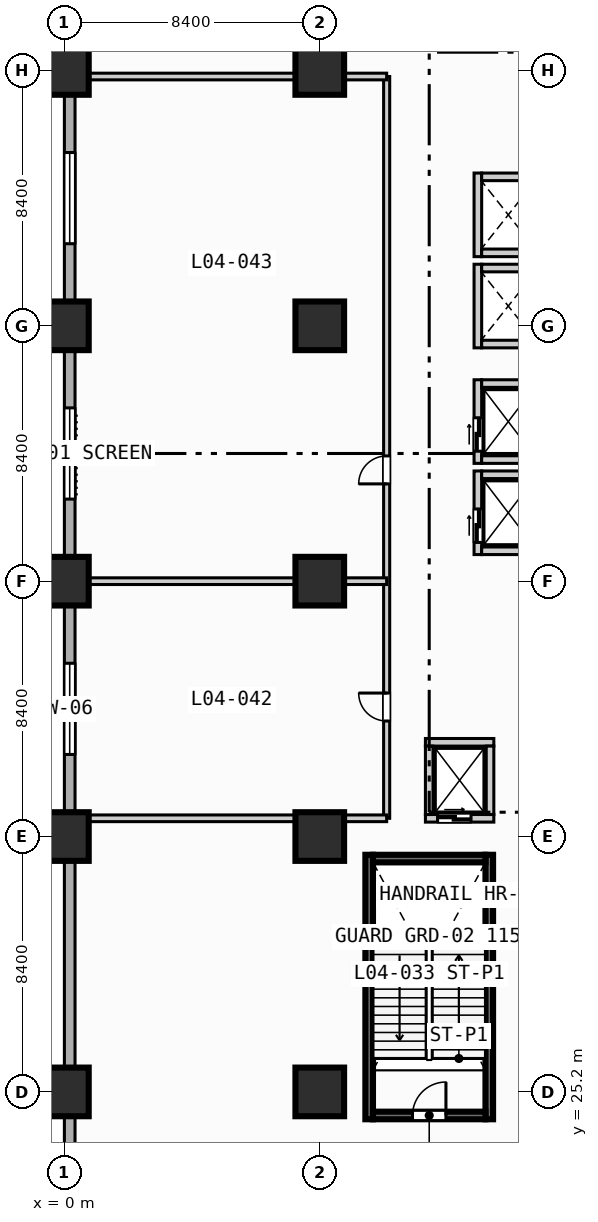
"""IFC4 building model, lengths in metres.
Left out: names, types, materials, properties, quantities, classifications, styles, units other than length and angle.
Written with IfcOpenShell. Run it as: python <this file> out.ifc"""

import sys

from ifc_helpers import new_model, si_unit, direction, frame, frame_2d, origin, origin_2d, place, context, subcontext, project, spatial, rectangle, extrude, element, fill, save


model = new_model("IFC4")
c1 = context("Model", 3, precision=1e-05, world=origin(), true_north=direction((0.0, 1.0)))
c2 = subcontext(c1, "Body", "Model", "MODEL_VIEW")
j1 = project(units=[si_unit("LENGTHUNIT", "METRE"), si_unit("PLANEANGLEUNIT", "RADIAN")], contexts=[c1])
p1 = place(None, origin())
s1 = spatial("IfcSite", under=j1, at=p1, CompositionType="ELEMENT")
p2 = place(p1, origin())
s2 = spatial("IfcBuilding", under=s1, at=p2, CompositionType="ELEMENT")
p3 = place(p2, frame((0.0, 0.0, 20.8)))
s3 = spatial("IfcBuildingStorey", under=s2, at=p3, CompositionType="ELEMENT", Elevation=20.8)
for number, where, z_axis, x_axis in (
    (1, (10.025, 24.3, 0.0), (0.0, 0.0, 1.0), (0.0, 1.0, 0.0)),
    (2, (13.975, 24.3, 0.0), (0.0, 0.0, 1.0), (0.0, 1.0, 0.0)),
):
    element("IfcWall", number, at=place(p3, frame(where, z_axis=z_axis, x_axis=x_axis)), inside=s3, PredefinedType="SOLIDWALL", context=c2, shape_type="SweptSolid", body=[
        extrude(rectangle(XDim=8.7, YDim=0.25, at=frame_2d((4.35, 0.0))), origin(), (0.0, 0.0, 1.0), 4.75),
    ])
p4 = place(p3, frame((10.15, 32.875, 0.0), z_axis=(0.0, 0.0, 1.0), x_axis=(1.0, 0.0, 0.0)))
e3 = element("IfcWall", 3, at=p4, inside=s3, PredefinedType="SOLIDWALL", context=c2, shape_type="SweptSolid", body=[
    extrude(rectangle(XDim=3.7, YDim=0.25, at=frame_2d((1.85, 0.0))), origin(), (0.0, 0.0, 1.0), 4.75),
])
for number, where, z_axis, x_axis in (
    (4, (0.0, 25.2, 0.0), (0.0, 0.0, 1.0), (1.0, 0.0, 0.0)),
    (5, (0.0, 33.6, 0.0), (0.0, 0.0, 1.0), (1.0, 0.0, 0.0)),
    (6, (0.0, 42.0, 0.0), (0.0, 0.0, 1.0), (1.0, 0.0, 0.0)),
    (7, (0.0, 50.4, 0.0), (0.0, 0.0, 1.0), (1.0, 0.0, 0.0)),
    (8, (0.0, 58.8, 0.0), (0.0, 0.0, 1.0), (1.0, 0.0, 0.0)),
    (9, (8.4, 25.2, 0.0), (0.0, 0.0, 1.0), (1.0, 0.0, 0.0)),
    (10, (8.4, 33.6, 0.0), (0.0, 0.0, 1.0), (1.0, 0.0, 0.0)),
    (11, (8.4, 42.0, 0.0), (0.0, 0.0, 1.0), (1.0, 0.0, 0.0)),
    (12, (8.4, 50.4, 0.0), (0.0, 0.0, 1.0), (1.0, 0.0, 0.0)),
    (13, (8.4, 58.8, 0.0), (0.0, 0.0, 1.0), (1.0, 0.0, 0.0)),
):
    element("IfcColumn", number, at=place(p3, frame(where, z_axis=z_axis, x_axis=x_axis)), inside=s3, PredefinedType="COLUMN", context=c2, shape_type="SweptSolid", body=[
        extrude(rectangle(XDim=1.6, YDim=1.6, at=origin_2d()), origin(), (0.0, 0.0, 1.0), 5.2),
    ])
p5 = place(p3, frame((0.175, 3.175, 0.0), z_axis=(0.0, 0.0, 1.0), x_axis=(0.0, 1.0, 0.0)))
e14 = element("IfcWall", 14, at=p5, inside=s3, PredefinedType="STANDARD", context=c2, shape_type="SweptSolid", body=[
    extrude(rectangle(XDim=86.05, YDim=0.35, at=frame_2d((43.025, 0.0))), origin(), (0.0, 0.0, 1.0), 4.75),
])
p6 = place(p5, frame((33.125, 0.0, 0.85)))
e15 = element("IfcOpeningElement", 15, at=p6, cuts=e14, PredefinedType="OPENING", context=c2, shape_type="SweptSolid", body=[
    extrude(rectangle(XDim=3.0, YDim=2.4, at=frame_2d((1.5, 1.2))), frame((0.0, 0.185, 0.0), z_axis=(0.0, -1.0, 0.0), x_axis=(1.0, 0.0, 0.0)), (0.0, 0.0, 1.0), 0.37),
])
p7 = place(p5, frame((41.525, 0.0, 0.85)))
e16 = element("IfcOpeningElement", 16, at=p7, cuts=e14, PredefinedType="OPENING", context=c2, shape_type="SweptSolid", body=[
    extrude(rectangle(XDim=3.0, YDim=2.4, at=frame_2d((1.5, 1.2))), frame((0.0, 0.185, 0.0), z_axis=(0.0, -1.0, 0.0), x_axis=(1.0, 0.0, 0.0)), (0.0, 0.0, 1.0), 0.37),
])
p8 = place(p5, frame((49.925, 0.0, 0.85)))
e17 = element("IfcOpeningElement", 17, at=p8, cuts=e14, PredefinedType="OPENING", context=c2, shape_type="SweptSolid", body=[
    extrude(rectangle(XDim=3.0, YDim=2.4, at=frame_2d((1.5, 1.2))), frame((0.0, 0.185, 0.0), z_axis=(0.0, -1.0, 0.0), x_axis=(1.0, 0.0, 0.0)), (0.0, 0.0, 1.0), 0.37),
])
p9 = place(p5, frame((66.725, 0.0, 0.85)))
e18 = element("IfcOpeningElement", 18, at=p9, cuts=e14, PredefinedType="OPENING", context=c2, shape_type="SweptSolid", body=[
    extrude(rectangle(XDim=3.0, YDim=2.4, at=frame_2d((1.5, 1.2))), frame((0.0, 0.185, 0.0), z_axis=(0.0, -1.0, 0.0), x_axis=(1.0, 0.0, 0.0)), (0.0, 0.0, 1.0), 0.37),
])
p10 = place(p5, frame((75.125, 0.0, 0.85)))
e19 = element("IfcOpeningElement", 19, at=p10, cuts=e14, PredefinedType="OPENING", context=c2, shape_type="SweptSolid", body=[
    extrude(rectangle(XDim=3.0, YDim=2.4, at=frame_2d((1.5, 1.2))), frame((0.0, 0.185, 0.0), z_axis=(0.0, -1.0, 0.0), x_axis=(1.0, 0.0, 0.0)), (0.0, 0.0, 1.0), 0.37),
])
p11 = place(p3, frame((11.875, 34.2, 0.0), z_axis=(0.0, 0.0, 1.0), x_axis=(1.0, 0.0, 0.0)))
e20 = element("IfcWall", 20, at=p11, inside=s3, PredefinedType="SOLIDWALL", context=c2, shape_type="SweptSolid", body=[
    extrude(rectangle(XDim=2.25, YDim=0.25, at=frame_2d((1.125, 0.0))), origin(), (0.0, 0.0, 1.0), 4.75),
])
p12 = place(p11, frame((0.4, 0.0, 0.0)))
e21 = element("IfcOpeningElement", 21, at=p12, cuts=e20, PredefinedType="OPENING", context=c2, shape_type="SweptSolid", body=[
    extrude(rectangle(XDim=1.1, YDim=2.15, at=frame_2d((0.55, 1.075))), frame((0.0, 0.135, 0.0), z_axis=(0.0, -1.0, 0.0), x_axis=(1.0, 0.0, 0.0)), (0.0, 0.0, 1.0), 0.27),
])
for number, where, z_axis, x_axis in (
    (22, (11.875, 36.7, 0.0), (0.0, 0.0, 1.0), (1.0, 0.0, 0.0)),
    (23, (12.0, 34.325, 0.0), (0.0, 0.0, 1.0), (0.0, 1.0, 0.0)),
    (24, (14.0, 34.325, 0.0), (0.0, 0.0, 1.0), (0.0, 1.0, 0.0)),
):
    element("IfcWall", number, at=place(p3, frame(where, z_axis=z_axis, x_axis=x_axis)), inside=s3, PredefinedType="SOLIDWALL", context=c2, shape_type="SweptSolid", body=[
        extrude(rectangle(XDim=2.25, YDim=0.25, at=frame_2d((1.125, 0.0))), origin(), (0.0, 0.0, 1.0), 4.75),
    ])
p13 = place(p3, frame((13.6, 42.875, 0.0), z_axis=(0.0, 0.0, 1.0), x_axis=(0.0, 1.0, 0.0)))
e25 = element("IfcWall", 25, at=p13, inside=s3, PredefinedType="SOLIDWALL", context=c2, shape_type="SweptSolid", body=[
    extrude(rectangle(XDim=2.75, YDim=0.25, at=frame_2d((1.375, 0.0))), origin(), (0.0, 0.0, 1.0), 4.75),
])
p14 = place(p13, frame((0.4, 0.0, 0.0)))
e26 = element("IfcOpeningElement", 26, at=p14, cuts=e25, PredefinedType="OPENING", context=c2, shape_type="SweptSolid", body=[
    extrude(rectangle(XDim=1.1, YDim=2.15, at=frame_2d((0.55, 1.075))), frame((0.0, 0.135, 0.0), z_axis=(0.0, -1.0, 0.0), x_axis=(1.0, 0.0, 0.0)), (0.0, 0.0, 1.0), 0.27),
])
for number, where, z_axis, x_axis in (
    (27, (13.725, 43.0, 0.0), (0.0, 0.0, 1.0), (1.0, 0.0, 0.0)),
    (28, (13.725, 45.5, 0.0), (0.0, 0.0, 1.0), (1.0, 0.0, 0.0)),
):
    element("IfcWall", number, at=place(p3, frame(where, z_axis=z_axis, x_axis=x_axis)), inside=s3, PredefinedType="SOLIDWALL", context=c2, shape_type="SweptSolid", body=[
        extrude(rectangle(XDim=1.75, YDim=0.25, at=frame_2d((0.875, 0.0))), origin(), (0.0, 0.0, 1.0), 4.75),
    ])
p15 = place(p3, frame((13.6, 45.875, 0.0), z_axis=(0.0, 0.0, 1.0), x_axis=(0.0, 1.0, 0.0)))
e29 = element("IfcWall", 29, at=p15, inside=s3, PredefinedType="SOLIDWALL", context=c2, shape_type="SweptSolid", body=[
    extrude(rectangle(XDim=2.75, YDim=0.25, at=frame_2d((1.375, 0.0))), origin(), (0.0, 0.0, 1.0), 4.75),
])
p16 = place(p15, frame((0.4, 0.0, 0.0)))
e30 = element("IfcOpeningElement", 30, at=p16, cuts=e29, PredefinedType="OPENING", context=c2, shape_type="SweptSolid", body=[
    extrude(rectangle(XDim=1.1, YDim=2.15, at=frame_2d((0.55, 1.075))), frame((0.0, 0.135, 0.0), z_axis=(0.0, -1.0, 0.0), x_axis=(1.0, 0.0, 0.0)), (0.0, 0.0, 1.0), 0.27),
])
for number, where, z_axis, x_axis in (
    (31, (13.725, 46.0, 0.0), (0.0, 0.0, 1.0), (1.0, 0.0, 0.0)),
    (32, (13.725, 48.5, 0.0), (0.0, 0.0, 1.0), (1.0, 0.0, 0.0)),
):
    element("IfcWall", number, at=place(p3, frame(where, z_axis=z_axis, x_axis=x_axis)), inside=s3, PredefinedType="SOLIDWALL", context=c2, shape_type="SweptSolid", body=[
        extrude(rectangle(XDim=1.75, YDim=0.25, at=frame_2d((0.875, 0.0))), origin(), (0.0, 0.0, 1.0), 4.75),
    ])
p17 = place(p3, frame((13.6, 49.675, 0.0), z_axis=(0.0, 0.0, 1.0), x_axis=(0.0, 1.0, 0.0)))
e33 = element("IfcWall", 33, at=p17, inside=s3, PredefinedType="SOLIDWALL", context=c2, shape_type="SweptSolid", body=[
    extrude(rectangle(XDim=2.75, YDim=0.25, at=frame_2d((1.375, 0.0))), origin(), (0.0, 0.0, 1.0), 4.75),
])
for number, where, z_axis, x_axis in (
    (34, (13.725, 49.8, 0.0), (0.0, 0.0, 1.0), (1.0, 0.0, 0.0)),
    (35, (13.725, 52.3, 0.0), (0.0, 0.0, 1.0), (1.0, 0.0, 0.0)),
):
    element("IfcWall", number, at=place(p3, frame(where, z_axis=z_axis, x_axis=x_axis)), inside=s3, PredefinedType="SOLIDWALL", context=c2, shape_type="SweptSolid", body=[
        extrude(rectangle(XDim=1.75, YDim=0.25, at=frame_2d((0.875, 0.0))), origin(), (0.0, 0.0, 1.0), 4.75),
    ])
p18 = place(p3, frame((13.6, 52.675, 0.0), z_axis=(0.0, 0.0, 1.0), x_axis=(0.0, 1.0, 0.0)))
e36 = element("IfcWall", 36, at=p18, inside=s3, PredefinedType="SOLIDWALL", context=c2, shape_type="SweptSolid", body=[
    extrude(rectangle(XDim=2.75, YDim=0.25, at=frame_2d((1.375, 0.0))), origin(), (0.0, 0.0, 1.0), 4.75),
])
for number, where, z_axis, x_axis in (
    (37, (13.725, 52.8, 0.0), (0.0, 0.0, 1.0), (1.0, 0.0, 0.0)),
    (38, (13.725, 55.3, 0.0), (0.0, 0.0, 1.0), (1.0, 0.0, 0.0)),
):
    element("IfcWall", number, at=place(p3, frame(where, z_axis=z_axis, x_axis=x_axis)), inside=s3, PredefinedType="SOLIDWALL", context=c2, shape_type="SweptSolid", body=[
        extrude(rectangle(XDim=1.75, YDim=0.25, at=frame_2d((0.875, 0.0))), origin(), (0.0, 0.0, 1.0), 4.75),
    ])
p19 = place(p3, frame((10.15, 24.425, 0.0), z_axis=(0.0, 0.0, 1.0), x_axis=(1.0, 0.0, 0.0)))
e39 = element("IfcWall", 39, at=p19, inside=s3, PredefinedType="SOLIDWALL", context=c2, shape_type="SweptSolid", body=[
    extrude(rectangle(XDim=3.7, YDim=0.25, at=frame_2d((1.85, 0.0))), origin(), (0.0, 0.0, 1.0), 4.75),
])
p20 = place(p19, frame((1.3, 0.0, 0.0)))
e40 = element("IfcOpeningElement", 40, at=p20, cuts=e39, PredefinedType="OPENING", context=c2, shape_type="SweptSolid", body=[
    extrude(rectangle(XDim=1.1, YDim=2.15, at=frame_2d((0.55, 1.075))), frame((0.0, 0.135, 0.0), z_axis=(0.0, -1.0, 0.0), x_axis=(1.0, 0.0, 0.0)), (0.0, 0.0, 1.0), 0.27),
])
p21 = place(p3, frame((10.6, 34.2, 0.0), z_axis=(0.0, 0.0, 1.0), x_axis=(0.0, 1.0, 0.0)))
e41 = element("IfcWall", 41, at=p21, inside=s3, PredefinedType="PARTITIONING", context=c2, shape_type="SweptSolid", body=[
    extrude(rectangle(XDim=24.4, YDim=0.2, at=frame_2d((12.2, 0.0))), origin(), (0.0, 0.0, 1.0), 4.75),
])
p22 = place(p21, frame((3.2, 0.0, 0.0)))
e42 = element("IfcOpeningElement", 42, at=p22, cuts=e41, PredefinedType="OPENING", context=c2, shape_type="SweptSolid", body=[
    extrude(rectangle(XDim=0.92, YDim=2.1, at=frame_2d((0.46, 1.05))), frame((0.0, 0.11, 0.0), z_axis=(0.0, -1.0, 0.0), x_axis=(1.0, 0.0, 0.0)), (0.0, 0.0, 1.0), 0.22),
])
p23 = place(p21, frame((11.0, 0.0, 0.0)))
e43 = element("IfcOpeningElement", 43, at=p23, cuts=e41, PredefinedType="OPENING", context=c2, shape_type="SweptSolid", body=[
    extrude(rectangle(XDim=0.92, YDim=2.1, at=frame_2d((0.46, 1.05))), frame((0.0, 0.11, 0.0), z_axis=(0.0, -1.0, 0.0), x_axis=(1.0, 0.0, 0.0)), (0.0, 0.0, 1.0), 0.22),
])
p24 = place(p3, frame((0.35, 34.2, 0.0), z_axis=(0.0, 0.0, 1.0), x_axis=(1.0, 0.0, 0.0)))
e44 = element("IfcWall", 44, at=p24, inside=s3, PredefinedType="PARTITIONING", context=c2, shape_type="SweptSolid", body=[
    extrude(rectangle(XDim=10.25, YDim=0.22, at=frame_2d((5.125, 0.0))), origin(), (0.0, 0.0, 1.0), 4.75),
])
for number, where, z_axis, x_axis in (
    (45, (0.35, 42.0, 0.0), (0.0, 0.0, 1.0), (1.0, 0.0, 0.0)),
    (46, (0.35, 58.6, 0.0), (0.0, 0.0, 1.0), (1.0, 0.0, 0.0)),
):
    element("IfcWall", number, at=place(p3, frame(where, z_axis=z_axis, x_axis=x_axis)), inside=s3, PredefinedType="PARTITIONING", context=c2, shape_type="SweptSolid", body=[
        extrude(rectangle(XDim=10.25, YDim=0.22, at=frame_2d((5.125, 0.0))), origin(), (0.0, 0.0, 1.0), 3.9),
    ])
p25 = place(p6, origin())
e47 = element("IfcWindow", 47, at=p25, inside=s3, PartitioningType="SINGLE_PANEL", PredefinedType="WINDOW", context=c2, shape_type="SweptSolid", body=[
    extrude(rectangle(XDim=3.0, YDim=2.4, at=frame_2d((1.5, 1.2))), frame((0.0, 0.03, 0.0), z_axis=(0.0, -1.0, 0.0), x_axis=(1.0, 0.0, 0.0)), (0.0, 0.0, 1.0), 0.06),
])
fill(e15, e47)
p26 = place(p7, origin())
e48 = element("IfcWindow", 48, at=p26, inside=s3, PartitioningType="SINGLE_PANEL", PredefinedType="WINDOW", context=c2, shape_type="SweptSolid", body=[
    extrude(rectangle(XDim=3.0, YDim=2.4, at=frame_2d((1.5, 1.2))), frame((0.0, 0.03, 0.0), z_axis=(0.0, -1.0, 0.0), x_axis=(1.0, 0.0, 0.0)), (0.0, 0.0, 1.0), 0.06),
])
fill(e16, e48)
p27 = place(p8, origin())
e49 = element("IfcWindow", 49, at=p27, inside=s3, PartitioningType="SINGLE_PANEL", PredefinedType="WINDOW", context=c2, shape_type="SweptSolid", body=[
    extrude(rectangle(XDim=3.0, YDim=2.4, at=frame_2d((1.5, 1.2))), frame((0.0, 0.03, 0.0), z_axis=(0.0, -1.0, 0.0), x_axis=(1.0, 0.0, 0.0)), (0.0, 0.0, 1.0), 0.06),
])
fill(e17, e49)
p28 = place(p12, origin())
e50 = element("IfcDoor", 50, at=p28, inside=s3, OperationType="SLIDING_TO_LEFT", PredefinedType="DOOR", context=c2, shape_type="SweptSolid", body=[
    extrude(rectangle(XDim=1.1, YDim=2.15, at=frame_2d((0.55, 1.075))), frame((0.0, 0.025, 0.0), z_axis=(0.0, -1.0, 0.0), x_axis=(1.0, 0.0, 0.0)), (0.0, 0.0, 1.0), 0.05),
])
fill(e21, e50)
p29 = place(p14, origin())
e51 = element("IfcDoor", 51, at=p29, inside=s3, OperationType="SLIDING_TO_LEFT", PredefinedType="DOOR", context=c2, shape_type="SweptSolid", body=[
    extrude(rectangle(XDim=1.1, YDim=2.15, at=frame_2d((0.55, 1.075))), frame((0.0, 0.025, 0.0), z_axis=(0.0, -1.0, 0.0), x_axis=(1.0, 0.0, 0.0)), (0.0, 0.0, 1.0), 0.05),
])
fill(e26, e51)
p30 = place(p16, origin())
e52 = element("IfcDoor", 52, at=p30, inside=s3, OperationType="SLIDING_TO_LEFT", PredefinedType="DOOR", context=c2, shape_type="SweptSolid", body=[
    extrude(rectangle(XDim=1.1, YDim=2.15, at=frame_2d((0.55, 1.075))), frame((0.0, 0.025, 0.0), z_axis=(0.0, -1.0, 0.0), x_axis=(1.0, 0.0, 0.0)), (0.0, 0.0, 1.0), 0.05),
])
fill(e30, e52)
p31 = place(p20, origin())
e53 = element("IfcDoor", 53, at=p31, inside=s3, OperationType="SINGLE_SWING_RIGHT", PredefinedType="DOOR", context=c2, shape_type="SweptSolid", body=[
    extrude(rectangle(XDim=1.1, YDim=2.15, at=frame_2d((0.55, 1.075))), frame((0.0, 0.025, 0.0), z_axis=(0.0, -1.0, 0.0), x_axis=(1.0, 0.0, 0.0)), (0.0, 0.0, 1.0), 0.05),
])
fill(e40, e53)
p32 = place(p22, origin())
e54 = element("IfcDoor", 54, at=p32, inside=s3, OperationType="SINGLE_SWING_RIGHT", PredefinedType="DOOR", context=c2, shape_type="SweptSolid", body=[
    extrude(rectangle(XDim=0.92, YDim=2.1, at=frame_2d((0.46, 1.05))), frame((0.0, 0.025, 0.0), z_axis=(0.0, -1.0, 0.0), x_axis=(1.0, 0.0, 0.0)), (0.0, 0.0, 1.0), 0.05),
])
fill(e42, e54)
p33 = place(p23, origin())
e55 = element("IfcDoor", 55, at=p33, inside=s3, OperationType="SINGLE_SWING_LEFT", PredefinedType="DOOR", context=c2, shape_type="SweptSolid", body=[
    extrude(rectangle(XDim=0.92, YDim=2.1, at=frame_2d((0.46, 1.05))), frame((0.0, 0.025, 0.0), z_axis=(0.0, -1.0, 0.0), x_axis=(1.0, 0.0, 0.0)), (0.0, 0.0, 1.0), 0.05),
])
fill(e43, e55)
save(model, sys.argv[1])
